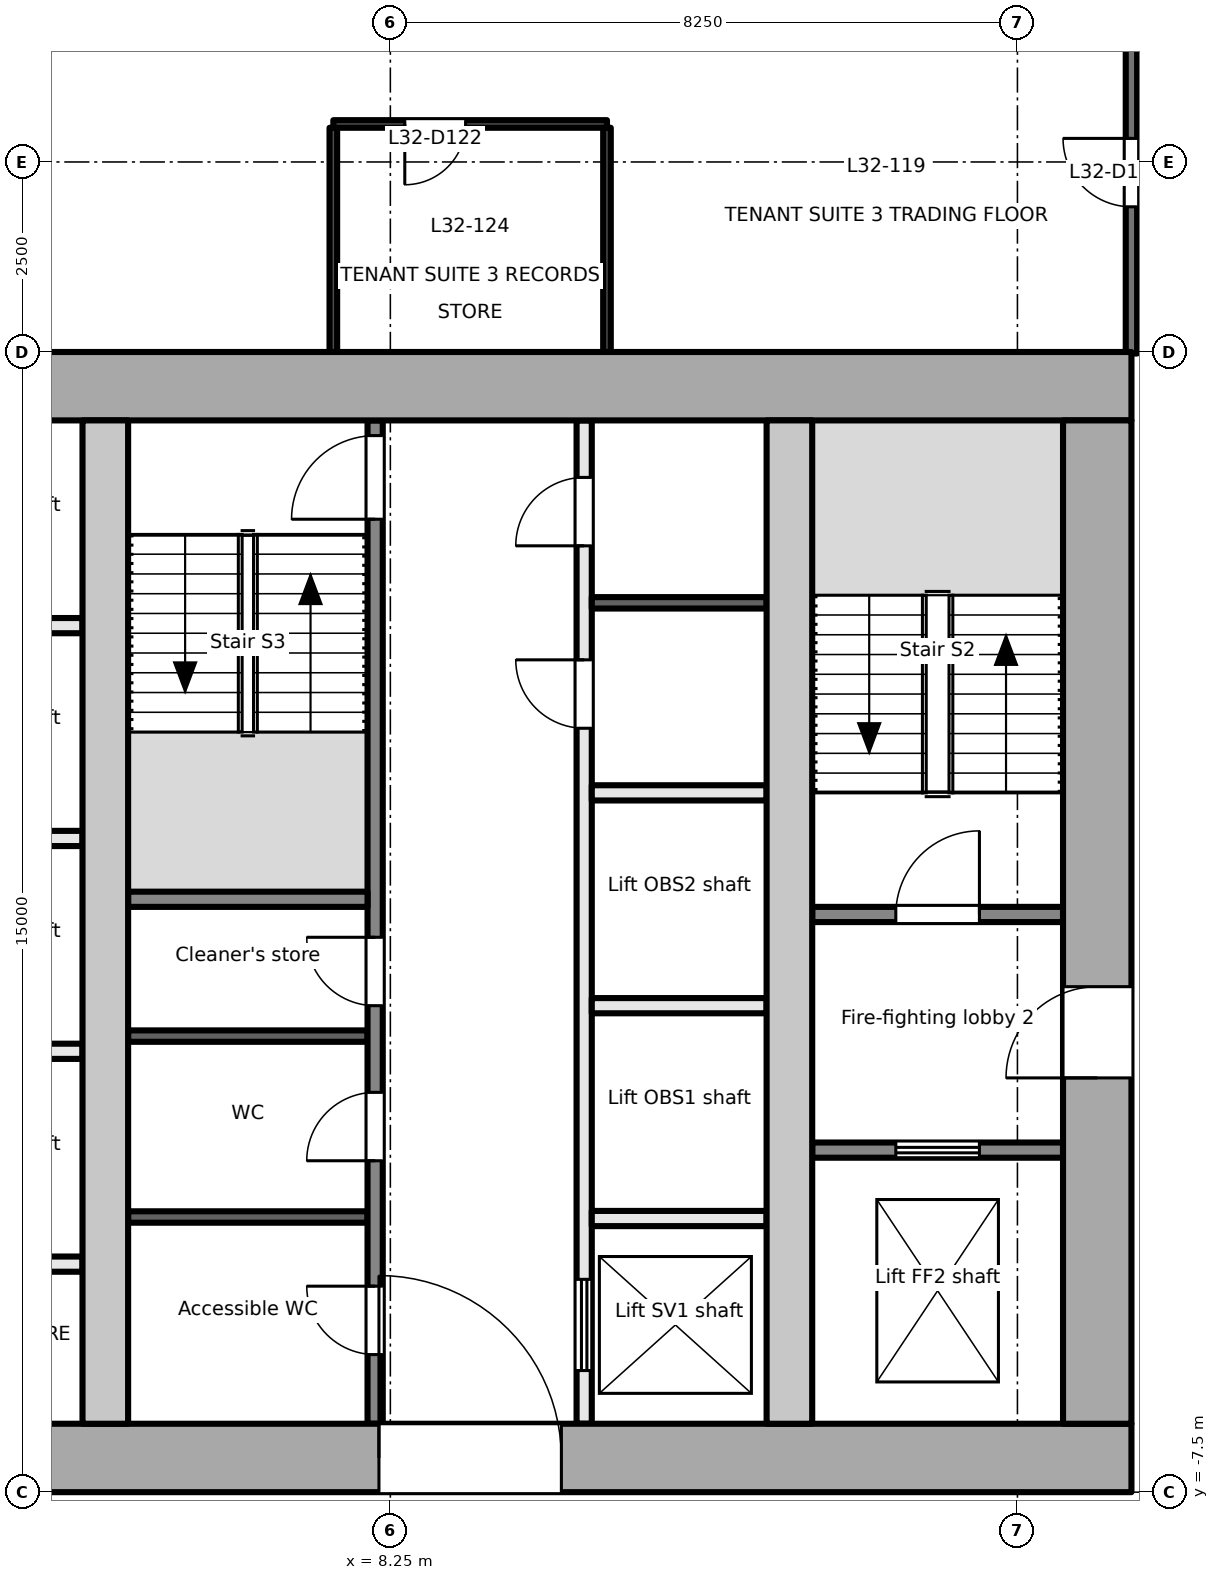
"""IFC4 building model, lengths in metres.
Left out: names, types, materials, properties, quantities, classifications, styles, units other than length and angle.
Written with IfcOpenShell. Run it as: python <this file> out.ifc"""

import sys

from ifc_helpers import new_model, si_unit, direction, frame, frame_2d, origin, place, context, subcontext, project, spatial, rectangle, extrude, element, fill, save


model = new_model("IFC4")
c1 = context("Model", 3, precision=1e-05, world=origin(), true_north=direction((0.0, 1.0)))
c2 = subcontext(c1, "Body", "Model", "MODEL_VIEW")
j1 = project(units=[si_unit("LENGTHUNIT", "METRE"), si_unit("PLANEANGLEUNIT", "RADIAN")], contexts=[c1])
p1 = place(None, origin())
s1 = spatial("IfcSite", under=j1, at=p1, CompositionType="ELEMENT")
p2 = place(p1, origin())
s2 = spatial("IfcBuilding", under=s1, at=p2, CompositionType="ELEMENT")
p3 = place(p2, frame((0.0, 0.0, 142.1)))
s3 = spatial("IfcBuildingStorey", under=s2, at=p3, CompositionType="ELEMENT", Elevation=142.1)
p4 = place(p3, frame((-18.0, -7.05, -0.2), z_axis=(0.0, 0.0, 1.0), x_axis=(1.0, 0.0, 0.0)))
e1 = element("IfcWall", 1, at=p4, inside=s3, PredefinedType="SHEAR", context=c2, shape_type="SweptSolid", body=[
    extrude(rectangle(XDim=36.0, YDim=0.9, at=frame_2d((18.0, 0.0))), origin(), (0.0, 0.0, 1.0), 4.0),
])
p5 = place(p4, frame((7.8, 0.0, 0.2)))
e2 = element("IfcOpeningElement", 2, at=p5, cuts=e1, PredefinedType="OPENING", context=c2, shape_type="SweptSolid", body=[
    extrude(rectangle(XDim=2.4, YDim=2.1, at=frame_2d((1.2, 1.05))), frame((0.0, 0.46, 0.0), z_axis=(0.0, -1.0, 0.0), x_axis=(1.0, 0.0, 0.0)), (0.0, 0.0, 1.0), 0.921),
])
p6 = place(p4, frame((17.4, 0.0, 0.2)))
e3 = element("IfcOpeningElement", 3, at=p6, cuts=e1, PredefinedType="OPENING", context=c2, shape_type="SweptSolid", body=[
    extrude(rectangle(XDim=1.2, YDim=2.1, at=frame_2d((0.6, 1.05))), frame((0.0, 0.46, 0.0), z_axis=(0.0, -1.0, 0.0), x_axis=(1.0, 0.0, 0.0)), (0.0, 0.0, 1.0), 0.921),
])
p7 = place(p4, frame((26.1, 0.0, 0.2)))
e4 = element("IfcOpeningElement", 4, at=p7, cuts=e1, PredefinedType="OPENING", context=c2, shape_type="SweptSolid", body=[
    extrude(rectangle(XDim=2.4, YDim=2.1, at=frame_2d((1.2, 1.05))), frame((0.0, 0.46, 0.0), z_axis=(0.0, -1.0, 0.0), x_axis=(1.0, 0.0, 0.0)), (0.0, 0.0, 1.0), 0.921),
])
p8 = place(p3, frame((-18.0, 7.05, -0.2), z_axis=(0.0, 0.0, 1.0), x_axis=(1.0, 0.0, 0.0)))
e5 = element("IfcWall", 5, at=p8, inside=s3, PredefinedType="SHEAR", context=c2, shape_type="SweptSolid", body=[
    extrude(rectangle(XDim=36.0, YDim=0.9, at=frame_2d((18.0, 0.0))), origin(), (0.0, 0.0, 1.0), 4.0),
])
p9 = place(p3, frame((17.55, -6.6, -0.2), z_axis=(0.0, 0.0, 1.0), x_axis=(0.0, 1.0, 0.0)))
e6 = element("IfcWall", 6, at=p9, inside=s3, PredefinedType="SHEAR", context=c2, shape_type="SweptSolid", body=[
    extrude(rectangle(XDim=13.2, YDim=0.9, at=frame_2d((6.6, 0.0))), origin(), (0.0, 0.0, 1.0), 4.0),
])
p10 = place(p9, frame((4.55, 0.0, 0.2)))
e7 = element("IfcOpeningElement", 7, at=p10, cuts=e6, PredefinedType="OPENING", context=c2, shape_type="SweptSolid", body=[
    extrude(rectangle(XDim=1.2, YDim=2.1, at=frame_2d((0.6, 1.05))), frame((0.0, 0.46, 0.0), z_axis=(0.0, -1.0, 0.0), x_axis=(1.0, 0.0, 0.0)), (0.0, 0.0, 1.0), 0.921),
])
for number, where, z_axis, x_axis in (
    (8, (4.5, -6.6, -0.2), (0.0, 0.0, 1.0), (0.0, 1.0, 0.0)),
    (9, (13.5, -6.6, -0.2), (0.0, 0.0, 1.0), (0.0, 1.0, 0.0)),
):
    element("IfcWall", number, at=place(p3, frame(where, z_axis=z_axis, x_axis=x_axis)), inside=s3, PredefinedType="SHEAR", context=c2, shape_type="SweptSolid", body=[
        extrude(rectangle(XDim=13.2, YDim=0.6, at=frame_2d((6.6, 0.0))), origin(), (0.0, 0.0, 1.0), 4.0),
    ])
p11 = place(p3, frame((13.8, -3.0, 0.0), z_axis=(0.0, 0.0, 1.0), x_axis=(1.0, 0.0, 0.0)))
e10 = element("IfcWall", 10, at=p11, inside=s3, PredefinedType="PARTITIONING", context=c2, shape_type="SweptSolid", body=[
    extrude(rectangle(XDim=3.3, YDim=0.2, at=frame_2d((1.65, 0.0))), origin(), (0.0, 0.0, 1.0), 3.8),
])
p12 = place(p11, frame((1.1, 0.0, 0.0)))
e11 = element("IfcOpeningElement", 11, at=p12, cuts=e10, PredefinedType="OPENING", context=c2, shape_type="SweptSolid", body=[
    extrude(rectangle(XDim=1.1, YDim=2.1, at=frame_2d((0.55, 1.05))), frame((0.0, 0.111, 0.0), z_axis=(0.0, -1.0, 0.0), x_axis=(1.0, 0.0, 0.0)), (0.0, 0.0, 1.0), 0.221),
])
p13 = place(p3, frame((13.8, 0.1, 0.0), z_axis=(0.0, 0.0, 1.0), x_axis=(1.0, 0.0, 0.0)))
e12 = element("IfcWall", 12, at=p13, inside=s3, PredefinedType="PARTITIONING", context=c2, shape_type="SweptSolid", body=[
    extrude(rectangle(XDim=3.3, YDim=0.2, at=frame_2d((1.65, 0.0))), origin(), (0.0, 0.0, 1.0), 3.8),
])
p14 = place(p13, frame((1.1, 0.0, 0.0)))
e13 = element("IfcOpeningElement", 13, at=p14, cuts=e12, PredefinedType="OPENING", context=c2, shape_type="SweptSolid", body=[
    extrude(rectangle(XDim=1.1, YDim=2.1, at=frame_2d((0.55, 1.05))), frame((0.0, 0.111, 0.0), z_axis=(0.0, -1.0, 0.0), x_axis=(1.0, 0.0, 0.0)), (0.0, 0.0, 1.0), 0.221),
])
for number, where, z_axis, x_axis in (
    (14, (1.9, -1.7, 0.0), (0.0, 0.0, 1.0), (1.0, 0.0, 0.0)),
    (15, (1.9, 1.1, 0.0), (0.0, 0.0, 1.0), (1.0, 0.0, 0.0)),
    (16, (1.9, 3.9, 0.0), (0.0, 0.0, 1.0), (1.0, 0.0, 0.0)),
    (17, (1.9, -4.5, 0.0), (0.0, 0.0, 1.0), (1.0, 0.0, 0.0)),
):
    element("IfcWall", number, at=place(p3, frame(where, z_axis=z_axis, x_axis=x_axis)), inside=s3, PredefinedType="PARTITIONING", context=c2, shape_type="SweptSolid", body=[
        extrude(rectangle(XDim=2.3, YDim=0.2, at=frame_2d((1.15, 0.0))), origin(), (0.0, 0.0, 1.0), 3.8),
    ])
p15 = place(p3, frame((8.05, -6.6, 0.0), z_axis=(0.0, 0.0, 1.0), x_axis=(0.0, 1.0, 0.0)))
e18 = element("IfcWall", 18, at=p15, inside=s3, PredefinedType="PARTITIONING", context=c2, shape_type="SweptSolid", body=[
    extrude(rectangle(XDim=13.2, YDim=0.2, at=frame_2d((6.6, 0.0))), origin(), (0.0, 0.0, 1.0), 3.8),
])
p16 = place(p15, frame((0.91, 0.0, 0.0)))
e19 = element("IfcOpeningElement", 19, at=p16, cuts=e18, PredefinedType="OPENING", context=c2, shape_type="SweptSolid", body=[
    extrude(rectangle(XDim=0.9, YDim=2.1, at=frame_2d((0.45, 1.05))), frame((0.0, 0.111, 0.0), z_axis=(0.0, -1.0, 0.0), x_axis=(1.0, 0.0, 0.0)), (0.0, 0.0, 1.0), 0.221),
])
p17 = place(p15, frame((3.46, 0.0, 0.0)))
e20 = element("IfcOpeningElement", 20, at=p17, cuts=e18, PredefinedType="OPENING", context=c2, shape_type="SweptSolid", body=[
    extrude(rectangle(XDim=0.9, YDim=2.1, at=frame_2d((0.45, 1.05))), frame((0.0, 0.111, 0.0), z_axis=(0.0, -1.0, 0.0), x_axis=(1.0, 0.0, 0.0)), (0.0, 0.0, 1.0), 0.221),
])
p18 = place(p15, frame((5.5, 0.0, 0.0)))
e21 = element("IfcOpeningElement", 21, at=p18, cuts=e18, PredefinedType="OPENING", context=c2, shape_type="SweptSolid", body=[
    extrude(rectangle(XDim=0.9, YDim=2.1, at=frame_2d((0.45, 1.05))), frame((0.0, 0.111, 0.0), z_axis=(0.0, -1.0, 0.0), x_axis=(1.0, 0.0, 0.0)), (0.0, 0.0, 1.0), 0.221),
])
p19 = place(p15, frame((11.9, 0.0, 0.0)))
e22 = element("IfcOpeningElement", 22, at=p19, cuts=e18, PredefinedType="OPENING", context=c2, shape_type="SweptSolid", body=[
    extrude(rectangle(XDim=1.1, YDim=2.1, at=frame_2d((0.55, 1.05))), frame((0.0, 0.111, 0.0), z_axis=(0.0, -1.0, 0.0), x_axis=(1.0, 0.0, 0.0)), (0.0, 0.0, 1.0), 0.221),
])
p20 = place(p3, frame((10.8, -6.6, 0.0), z_axis=(0.0, 0.0, 1.0), x_axis=(0.0, 1.0, 0.0)))
e23 = element("IfcWall", 23, at=p20, inside=s3, PredefinedType="PARTITIONING", context=c2, shape_type="SweptSolid", body=[
    extrude(rectangle(XDim=13.2, YDim=0.2, at=frame_2d((6.6, 0.0))), origin(), (0.0, 0.0, 1.0), 3.8),
])
p21 = place(p20, frame((0.7, 0.0, 0.0)))
e24 = element("IfcOpeningElement", 24, at=p21, cuts=e23, PredefinedType="OPENING", context=c2, shape_type="SweptSolid", body=[
    extrude(rectangle(XDim=1.2, YDim=2.1, at=frame_2d((0.6, 1.05))), frame((0.0, 0.111, 0.0), z_axis=(0.0, -1.0, 0.0), x_axis=(1.0, 0.0, 0.0)), (0.0, 0.0, 1.0), 0.221),
])
p22 = place(p20, frame((9.15, 0.0, 0.0)))
e25 = element("IfcOpeningElement", 25, at=p22, cuts=e23, PredefinedType="OPENING", context=c2, shape_type="SweptSolid", body=[
    extrude(rectangle(XDim=0.9, YDim=2.1, at=frame_2d((0.45, 1.05))), frame((0.0, 0.111, 0.0), z_axis=(0.0, -1.0, 0.0), x_axis=(1.0, 0.0, 0.0)), (0.0, 0.0, 1.0), 0.221),
])
p23 = place(p20, frame((11.55, 0.0, 0.0)))
e26 = element("IfcOpeningElement", 26, at=p23, cuts=e23, PredefinedType="OPENING", context=c2, shape_type="SweptSolid", body=[
    extrude(rectangle(XDim=0.9, YDim=2.1, at=frame_2d((0.45, 1.05))), frame((0.0, 0.111, 0.0), z_axis=(0.0, -1.0, 0.0), x_axis=(1.0, 0.0, 0.0)), (0.0, 0.0, 1.0), 0.221),
])
p24 = place(p3, frame((4.8, 0.3, 0.0), z_axis=(0.0, 0.0, 1.0), x_axis=(1.0, 0.0, 0.0)))
e27 = element("IfcWall", 27, at=p24, inside=s3, PredefinedType="PARTITIONING", context=c2, shape_type="SweptSolid", body=[
    extrude(rectangle(XDim=3.15, YDim=0.2, at=frame_2d((1.575, 0.0))), origin(), (0.0, 0.0, 1.0), 3.8),
])
for number, where, z_axis, x_axis in (
    (28, (4.8, -3.88, 0.0), (0.0, 0.0, 1.0), (1.0, 0.0, 0.0)),
    (29, (4.8, -1.5, 0.0), (0.0, 0.0, 1.0), (1.0, 0.0, 0.0)),
):
    element("IfcWall", number, at=place(p3, frame(where, z_axis=z_axis, x_axis=x_axis)), inside=s3, PredefinedType="PARTITIONING", context=c2, shape_type="SweptSolid", body=[
        extrude(rectangle(XDim=3.15, YDim=0.15, at=frame_2d((1.575, 0.0))), origin(), (0.0, 0.0, 1.0), 3.8),
    ])
for number, where, z_axis, x_axis in (
    (30, (10.9, -3.9, 0.0), (0.0, 0.0, 1.0), (1.0, 0.0, 0.0)),
    (31, (10.9, -1.1, 0.0), (0.0, 0.0, 1.0), (1.0, 0.0, 0.0)),
    (32, (10.9, 1.7, 0.0), (0.0, 0.0, 1.0), (1.0, 0.0, 0.0)),
):
    element("IfcWall", number, at=place(p3, frame(where, z_axis=z_axis, x_axis=x_axis)), inside=s3, PredefinedType="PARTITIONING", context=c2, shape_type="SweptSolid", body=[
        extrude(rectangle(XDim=2.3, YDim=0.2, at=frame_2d((1.15, 0.0))), origin(), (0.0, 0.0, 1.0), 3.8),
    ])
p25 = place(p3, frame((10.9, 4.2, 0.0), z_axis=(0.0, 0.0, 1.0), x_axis=(1.0, 0.0, 0.0)))
e33 = element("IfcWall", 33, at=p25, inside=s3, PredefinedType="PARTITIONING", context=c2, shape_type="SweptSolid", body=[
    extrude(rectangle(XDim=2.3, YDim=0.15, at=frame_2d((1.15, 0.0))), origin(), (0.0, 0.0, 1.0), 3.8),
])
p26 = place(p3, frame((18.0, 7.48, 0.0), z_axis=(0.0, 0.0, 1.0), x_axis=(0.0, 1.0, 0.0)))
e34 = element("IfcWall", 34, at=p26, inside=s3, PredefinedType="PARTITIONING", context=c2, shape_type="SweptSolid", body=[
    extrude(rectangle(XDim=4.76, YDim=0.15, at=frame_2d((2.38, 0.0))), origin(), (0.0, 0.0, 1.0), 3.8),
])
p27 = place(p26, frame((1.93, 0.0, 0.0)))
e35 = element("IfcOpeningElement", 35, at=p27, cuts=e34, PredefinedType="OPENING", context=c2, shape_type="SweptSolid", body=[
    extrude(rectangle(XDim=0.9, YDim=2.1, at=frame_2d((0.45, 1.05))), frame((0.0, 0.085, 0.0), z_axis=(0.0, -1.0, 0.0), x_axis=(1.0, 0.0, 0.0)), (0.0, 0.0, 1.0), 0.171),
])
p28 = place(p3, frame((7.5, 10.45, 0.0), z_axis=(0.0, 0.0, 1.0), x_axis=(0.0, -1.0, 0.0)))
e36 = element("IfcWall", 36, at=p28, inside=s3, PredefinedType="PARTITIONING", context=c2, shape_type="SweptSolid", body=[
    extrude(rectangle(XDim=2.95, YDim=0.1, at=frame_2d((1.475, 0.0))), origin(), (0.0, 0.0, 1.0), 3.8),
])
p29 = place(p3, frame((11.1, 10.5, 0.0), z_axis=(0.0, 0.0, 1.0), x_axis=(-1.0, 0.0, 0.0)))
e37 = element("IfcWall", 37, at=p29, inside=s3, PredefinedType="PARTITIONING", context=c2, shape_type="SweptSolid", body=[
    extrude(rectangle(XDim=3.6, YDim=0.1, at=frame_2d((1.8, 0.0))), origin(), (0.0, 0.0, 1.0), 3.5),
])
p30 = place(p29, frame((1.86, 0.0, 0.0)))
e38 = element("IfcOpeningElement", 38, at=p30, cuts=e37, PredefinedType="OPENING", context=c2, shape_type="SweptSolid", body=[
    extrude(rectangle(XDim=0.8, YDim=2.1, at=frame_2d((0.4, 1.05))), frame((0.0, 0.061, 0.0), z_axis=(0.0, -1.0, 0.0), x_axis=(1.0, 0.0, 0.0)), (0.0, 0.0, 1.0), 0.121),
])
p31 = place(p3, frame((11.1, 7.5, 0.0), z_axis=(0.0, 0.0, 1.0), x_axis=(0.0, 1.0, 0.0)))
e39 = element("IfcWall", 39, at=p31, inside=s3, PredefinedType="PARTITIONING", context=c2, shape_type="SweptSolid", body=[
    extrude(rectangle(XDim=2.95, YDim=0.1, at=frame_2d((1.475, 0.0))), origin(), (0.0, 0.0, 1.0), 3.8),
])
p32 = place(p12, origin())
e40 = element("IfcDoor", 40, at=p32, inside=s3, OperationType="DOUBLE_DOOR_SLIDING", PredefinedType="DOOR", context=c2, shape_type="SweptSolid", body=[
    extrude(rectangle(XDim=1.1, YDim=2.1, at=frame_2d((0.55, 1.05))), frame((0.0, 0.025, 0.0), z_axis=(0.0, -1.0, 0.0), x_axis=(1.0, 0.0, 0.0)), (0.0, 0.0, 1.0), 0.05),
])
fill(e11, e40)
p33 = place(p10, origin())
e41 = element("IfcDoor", 41, at=p33, inside=s3, OperationType="SINGLE_SWING_LEFT", PredefinedType="DOOR", context=c2, shape_type="SweptSolid", body=[
    extrude(rectangle(XDim=1.2, YDim=2.1, at=frame_2d((0.6, 1.05))), frame((0.0, 0.025, 0.0), z_axis=(0.0, -1.0, 0.0), x_axis=(1.0, 0.0, 0.0)), (0.0, 0.0, 1.0), 0.05),
])
fill(e7, e41)
p34 = place(p14, origin())
e42 = element("IfcDoor", 42, at=p34, inside=s3, OperationType="SINGLE_SWING_RIGHT", PredefinedType="DOOR", context=c2, shape_type="SweptSolid", body=[
    extrude(rectangle(XDim=1.1, YDim=2.1, at=frame_2d((0.55, 1.05))), frame((0.0, 0.025, 0.0), z_axis=(0.0, -1.0, 0.0), x_axis=(1.0, 0.0, 0.0)), (0.0, 0.0, 1.0), 0.05),
])
fill(e13, e42)
p35 = place(p16, origin())
e43 = element("IfcDoor", 43, at=p35, inside=s3, OperationType="SINGLE_SWING_RIGHT", PredefinedType="DOOR", context=c2, shape_type="SweptSolid", body=[
    extrude(rectangle(XDim=0.9, YDim=2.1, at=frame_2d((0.45, 1.05))), frame((0.0, 0.025, 0.0), z_axis=(0.0, -1.0, 0.0), x_axis=(1.0, 0.0, 0.0)), (0.0, 0.0, 1.0), 0.05),
])
fill(e19, e43)
p36 = place(p17, origin())
e44 = element("IfcDoor", 44, at=p36, inside=s3, OperationType="SINGLE_SWING_LEFT", PredefinedType="DOOR", context=c2, shape_type="SweptSolid", body=[
    extrude(rectangle(XDim=0.9, YDim=2.1, at=frame_2d((0.45, 1.05))), frame((0.0, 0.025, 0.0), z_axis=(0.0, -1.0, 0.0), x_axis=(1.0, 0.0, 0.0)), (0.0, 0.0, 1.0), 0.05),
])
fill(e20, e44)
p37 = place(p18, origin())
e45 = element("IfcDoor", 45, at=p37, inside=s3, OperationType="SINGLE_SWING_RIGHT", PredefinedType="DOOR", context=c2, shape_type="SweptSolid", body=[
    extrude(rectangle(XDim=0.9, YDim=2.1, at=frame_2d((0.45, 1.05))), frame((0.0, 0.025, 0.0), z_axis=(0.0, -1.0, 0.0), x_axis=(1.0, 0.0, 0.0)), (0.0, 0.0, 1.0), 0.05),
])
fill(e21, e45)
p38 = place(p19, origin())
e46 = element("IfcDoor", 46, at=p38, inside=s3, OperationType="SINGLE_SWING_LEFT", PredefinedType="DOOR", context=c2, shape_type="SweptSolid", body=[
    extrude(rectangle(XDim=1.1, YDim=2.1, at=frame_2d((0.55, 1.05))), frame((0.0, 0.025, 0.0), z_axis=(0.0, -1.0, 0.0), x_axis=(1.0, 0.0, 0.0)), (0.0, 0.0, 1.0), 0.05),
])
fill(e22, e46)
p39 = place(p7, origin())
e47 = element("IfcDoor", 47, at=p39, inside=s3, OperationType="DOUBLE_DOOR_DOUBLE_SWING", PredefinedType="DOOR", context=c2, shape_type="SweptSolid", body=[
    extrude(rectangle(XDim=2.4, YDim=2.1, at=frame_2d((1.2, 1.05))), frame((0.0, 0.025, 0.0), z_axis=(0.0, -1.0, 0.0), x_axis=(1.0, 0.0, 0.0)), (0.0, 0.0, 1.0), 0.05),
])
fill(e4, e47)
p40 = place(p21, origin())
e48 = element("IfcDoor", 48, at=p40, inside=s3, OperationType="DOUBLE_DOOR_SLIDING", PredefinedType="DOOR", context=c2, shape_type="SweptSolid", body=[
    extrude(rectangle(XDim=1.2, YDim=2.1, at=frame_2d((0.6, 1.05))), frame((0.0, 0.025, 0.0), z_axis=(0.0, -1.0, 0.0), x_axis=(1.0, 0.0, 0.0)), (0.0, 0.0, 1.0), 0.05),
])
fill(e24, e48)
p41 = place(p22, origin())
e49 = element("IfcDoor", 49, at=p41, inside=s3, OperationType="SINGLE_SWING_RIGHT", PredefinedType="DOOR", context=c2, shape_type="SweptSolid", body=[
    extrude(rectangle(XDim=0.9, YDim=2.1, at=frame_2d((0.45, 1.05))), frame((0.0, 0.025, 0.0), z_axis=(0.0, -1.0, 0.0), x_axis=(1.0, 0.0, 0.0)), (0.0, 0.0, 1.0), 0.05),
])
fill(e25, e49)
p42 = place(p23, origin())
e50 = element("IfcDoor", 50, at=p42, inside=s3, OperationType="SINGLE_SWING_LEFT", PredefinedType="DOOR", context=c2, shape_type="SweptSolid", body=[
    extrude(rectangle(XDim=0.9, YDim=2.1, at=frame_2d((0.45, 1.05))), frame((0.0, 0.025, 0.0), z_axis=(0.0, -1.0, 0.0), x_axis=(1.0, 0.0, 0.0)), (0.0, 0.0, 1.0), 0.05),
])
fill(e26, e50)
p43 = place(p27, origin())
e51 = element("IfcDoor", 51, at=p43, inside=s3, OperationType="SINGLE_SWING_RIGHT", PredefinedType="DOOR", context=c2, shape_type="SweptSolid", body=[
    extrude(rectangle(XDim=0.9, YDim=2.1, at=frame_2d((0.45, 1.05))), frame((0.0, 0.025, 0.0), z_axis=(0.0, -1.0, 0.0), x_axis=(1.0, 0.0, 0.0)), (0.0, 0.0, 1.0), 0.05),
])
fill(e35, e51)
p44 = place(p30, origin())
e52 = element("IfcDoor", 52, at=p44, inside=s3, OperationType="SINGLE_SWING_RIGHT", PredefinedType="DOOR", context=c2, shape_type="SweptSolid", body=[
    extrude(rectangle(XDim=0.8, YDim=2.1, at=frame_2d((0.4, 1.05))), frame((0.0, 0.025, 0.0), z_axis=(0.0, -1.0, 0.0), x_axis=(1.0, 0.0, 0.0)), (0.0, 0.0, 1.0), 0.05),
])
fill(e38, e52)
save(model, sys.argv[1])
